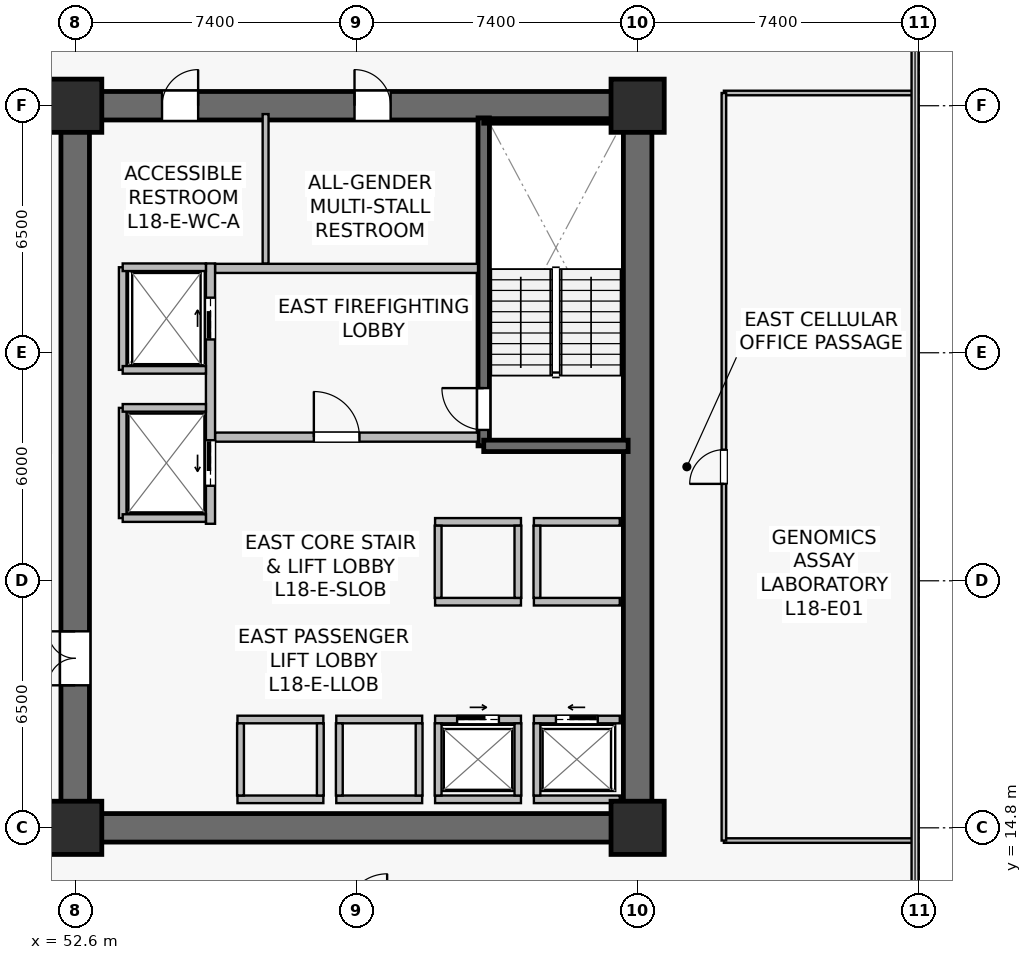
"""IFC4 building model, lengths in metres.
Left out: names, types, materials, properties, quantities, classifications, styles, units other than length and angle.
Written with IfcOpenShell. Run it as: python <this file> out.ifc"""

import sys

from ifc_helpers import new_model, si_unit, direction, frame, frame_2d, origin, origin_2d, place, context, subcontext, project, spatial, rectangle, extrude, source, transform, mapped, element, fill, save


model = new_model("IFC4")
c1 = context("Model", 3, precision=1e-05, world=origin(), true_north=direction((0.0, 1.0)))
c2 = subcontext(c1, "Body", "Model", "MODEL_VIEW")
j1 = project(units=[si_unit("LENGTHUNIT", "METRE"), si_unit("PLANEANGLEUNIT", "RADIAN")], contexts=[c1])
p1 = place(None, origin())
s1 = spatial("IfcSite", under=j1, at=p1, CompositionType="ELEMENT")
p2 = place(p1, origin())
s2 = spatial("IfcBuilding", under=s1, at=p2, CompositionType="ELEMENT")
p3 = place(p2, frame((0.0, 0.0, 74.4)))
s3 = spatial("IfcBuildingStorey", under=s2, at=p3, CompositionType="ELEMENT", Elevation=74.4)
p4 = place(p3, frame((52.225, 14.8, 0.0), z_axis=(0.0, 0.0, 1.0), x_axis=(1.0, 0.0, 0.0)))
e1 = element("IfcWall", 1, at=p4, inside=s3, PredefinedType="SHEAR", context=c2, shape_type="SweptSolid", body=[
    extrude(rectangle(XDim=15.55, YDim=0.75, at=frame_2d((7.775, 0.0))), origin(), (0.0, 0.0, 1.0), 3.78),
])
p5 = place(p3, frame((52.225, 33.8, 0.0), z_axis=(0.0, 0.0, 1.0), x_axis=(1.0, 0.0, 0.0)))
e2 = element("IfcWall", 2, at=p5, inside=s3, PredefinedType="SHEAR", context=c2, shape_type="SweptSolid", body=[
    extrude(rectangle(XDim=15.55, YDim=0.75, at=frame_2d((7.775, 0.0))), origin(), (0.0, 0.0, 1.0), 3.78),
])
p6 = place(p5, frame((7.725, 0.0, 0.0)))
e3 = element("IfcOpeningElement", 3, at=p6, cuts=e2, PredefinedType="OPENING", context=c2, shape_type="SweptSolid", body=[
    extrude(rectangle(XDim=0.95, YDim=2.15, at=frame_2d((0.475, 1.075))), frame((0.0, 0.385, 0.0), z_axis=(0.0, -1.0, 0.0), x_axis=(1.0, 0.0, 0.0)), (0.0, 0.0, 1.0), 0.77),
])
p7 = place(p5, frame((2.66, 0.0, 0.0)))
e4 = element("IfcOpeningElement", 4, at=p7, cuts=e2, PredefinedType="OPENING", context=c2, shape_type="SweptSolid", body=[
    extrude(rectangle(XDim=0.95, YDim=2.15, at=frame_2d((0.475, 1.075))), frame((0.0, 0.385, 0.0), z_axis=(0.0, -1.0, 0.0), x_axis=(1.0, 0.0, 0.0)), (0.0, 0.0, 1.0), 0.77),
])
p8 = place(p3, frame((52.6, 15.175, 0.0), z_axis=(0.0, 0.0, 1.0), x_axis=(0.0, 1.0, 0.0)))
e5 = element("IfcWall", 5, at=p8, inside=s3, PredefinedType="SHEAR", context=c2, shape_type="SweptSolid", body=[
    extrude(rectangle(XDim=18.25, YDim=0.75, at=frame_2d((9.125, 0.0))), origin(), (0.0, 0.0, 1.0), 3.78),
])
p9 = place(p8, frame((3.375, 0.0, 0.0)))
e6 = element("IfcOpeningElement", 6, at=p9, cuts=e5, PredefinedType="OPENING", context=c2, shape_type="SweptSolid", body=[
    extrude(rectangle(XDim=1.42, YDim=2.2, at=frame_2d((0.71, 1.1))), frame((0.0, 0.385, 0.0), z_axis=(0.0, -1.0, 0.0), x_axis=(1.0, 0.0, 0.0)), (0.0, 0.0, 1.0), 0.77),
])
p10 = place(p3, frame((67.4, 15.175, 0.0), z_axis=(0.0, 0.0, 1.0), x_axis=(0.0, 1.0, 0.0)))
e7 = element("IfcWall", 7, at=p10, inside=s3, PredefinedType="SHEAR", context=c2, shape_type="SweptSolid", body=[
    extrude(rectangle(XDim=18.25, YDim=0.75, at=frame_2d((9.125, 0.0))), origin(), (0.0, 0.0, 1.0), 3.78),
])
p11 = place(p3, frame((63.35, 24.85, 0.0), z_axis=(0.0, 0.0, 1.0), x_axis=(0.0, 1.0, 0.0)))
e8 = element("IfcWall", 8, at=p11, inside=s3, PredefinedType="SHEAR", context=c2, shape_type="SweptSolid", body=[
    extrude(rectangle(XDim=8.63, YDim=0.3, at=frame_2d((4.315, 0.0))), origin(), (0.0, 0.0, 1.0), 3.78),
])
p12 = place(p11, frame((0.42, 0.0, 0.0)))
e9 = element("IfcOpeningElement", 9, at=p12, cuts=e8, PredefinedType="OPENING", context=c2, shape_type="SweptSolid", body=[
    extrude(rectangle(XDim=1.1, YDim=2.15, at=frame_2d((0.55, 1.075))), frame((0.0, 0.16, 0.0), z_axis=(0.0, -1.0, 0.0), x_axis=(1.0, 0.0, 0.0)), (0.0, 0.0, 1.0), 0.32),
])
p13 = place(p3, frame((63.35, 24.85, 0.0), z_axis=(0.0, 0.0, 1.0), x_axis=(1.0, 0.0, 0.0)))
e10 = element("IfcWall", 10, at=p13, inside=s3, PredefinedType="SHEAR", context=c2, shape_type="SweptSolid", body=[
    extrude(rectangle(XDim=3.8, YDim=0.3, at=frame_2d((1.9, 0.0))), origin(), (0.0, 0.0, 1.0), 3.78),
])
p14 = place(p3, frame((63.35, 33.4, 0.0), z_axis=(0.0, 0.0, 1.0), x_axis=(1.0, 0.0, 0.0)))
e11 = element("IfcWall", 11, at=p14, inside=s3, PredefinedType="SOLIDWALL", context=c2, shape_type="SweptSolid", body=[
    extrude(rectangle(XDim=3.72, YDim=0.12, at=frame_2d((1.86, 0.0))), origin(), (0.0, 0.0, 1.0), 3.78),
])
m1 = source(origin(), c2, "Body", "SweptSolid", [
    extrude(rectangle(XDim=1.4, YDim=1.4, at=origin_2d()), origin(), (0.0, 0.0, 1.0), 4.1),
])
for number, where, z_axis, x_axis in (
    (12, (52.6, 14.8, 0.0), (0.0, 0.0, 1.0), (1.0, 0.0, 0.0)),
    (13, (67.4, 14.8, 0.0), (0.0, 0.0, 1.0), (1.0, 0.0, 0.0)),
    (14, (52.6, 33.8, 0.0), (0.0, 0.0, 1.0), (1.0, 0.0, 0.0)),
    (15, (67.4, 33.8, 0.0), (0.0, 0.0, 1.0), (1.0, 0.0, 0.0)),
):
    element("IfcColumn", number, at=place(p3, frame(where, z_axis=z_axis, x_axis=x_axis)), inside=s3, PredefinedType="COLUMN", context=c2, shape_type="MappedRepresentation", body=[
        mapped(m1, transform((0.0, 0.0, 0.0), scale=1.0)),
    ])
p15 = place(p3, frame((56.28, 25.08, 0.0), z_axis=(0.0, 0.0, 1.0), x_axis=(1.0, 0.0, 0.0)))
e16 = element("IfcWall", 16, at=p15, inside=s3, PredefinedType="SOLIDWALL", context=c2, shape_type="SweptSolid", body=[
    extrude(rectangle(XDim=6.92, YDim=0.24, at=frame_2d((3.46, 0.0))), origin(), (0.0, 0.0, 1.0), 3.115),
])
p16 = place(p15, frame((2.6, 0.0, 0.0)))
e17 = element("IfcOpeningElement", 17, at=p16, cuts=e16, PredefinedType="OPENING", context=c2, shape_type="SweptSolid", body=[
    extrude(rectangle(XDim=1.2, YDim=2.16, at=frame_2d((0.6, 1.08))), frame((0.0, 0.13, 0.0), z_axis=(0.0, -1.0, 0.0), x_axis=(1.0, 0.0, 0.0)), (0.0, 0.0, 1.0), 0.26),
])
p17 = place(p3, frame((56.28, 29.52, 0.0), z_axis=(0.0, 0.0, 1.0), x_axis=(1.0, 0.0, 0.0)))
e18 = element("IfcWall", 18, at=p17, inside=s3, PredefinedType="SOLIDWALL", context=c2, shape_type="SweptSolid", body=[
    extrude(rectangle(XDim=6.92, YDim=0.24, at=frame_2d((3.46, 0.0))), origin(), (0.0, 0.0, 1.0), 3.115),
])
p18 = place(p3, frame((56.16, 22.8, 0.0), z_axis=(0.0, 0.0, 1.0), x_axis=(0.0, 1.0, 0.0)))
e19 = element("IfcWall", 19, at=p18, inside=s3, PredefinedType="SOLIDWALL", context=c2, shape_type="SweptSolid", body=[
    extrude(rectangle(XDim=6.85, YDim=0.24, at=frame_2d((3.425, 0.0))), origin(), (0.0, 0.0, 1.0), 2.865),
])
p19 = place(p18, frame((4.85, 0.0, 0.0)))
e20 = element("IfcOpeningElement", 20, at=p19, cuts=e19, PredefinedType="OPENING", context=c2, shape_type="SweptSolid", body=[
    extrude(rectangle(XDim=1.1, YDim=2.22, at=frame_2d((0.55, 1.11))), frame((0.0, 0.13, 0.0), z_axis=(0.0, -1.0, 0.0), x_axis=(1.0, 0.0, 0.0)), (0.0, 0.0, 1.0), 0.26),
])
p20 = place(p18, frame((1.0, 0.0, 0.0)))
e21 = element("IfcOpeningElement", 21, at=p20, cuts=e19, PredefinedType="OPENING", context=c2, shape_type="SweptSolid", body=[
    extrude(rectangle(XDim=1.2, YDim=2.22, at=frame_2d((0.6, 1.11))), frame((0.0, 0.13, 0.0), z_axis=(0.0, -1.0, 0.0), x_axis=(1.0, 0.0, 0.0)), (0.0, 0.0, 1.0), 0.26),
])
p21 = place(p3, frame((64.67, 17.65, 0.0), z_axis=(0.0, 0.0, 1.0), x_axis=(1.0, 0.0, 0.0)))
e22 = element("IfcWall", 22, at=p21, inside=s3, PredefinedType="SOLIDWALL", context=c2, shape_type="SweptSolid", body=[
    extrude(rectangle(XDim=2.26, YDim=0.2, at=frame_2d((1.13, 0.0))), origin(), (0.0, 0.0, 1.0), 3.78),
])
p22 = place(p21, frame((0.58, 0.0, 0.0)))
e23 = element("IfcOpeningElement", 23, at=p22, cuts=e22, PredefinedType="OPENING", context=c2, shape_type="SweptSolid", body=[
    extrude(rectangle(XDim=1.1, YDim=2.22, at=frame_2d((0.55, 1.11))), frame((0.0, 0.11, 0.0), z_axis=(0.0, -1.0, 0.0), x_axis=(1.0, 0.0, 0.0)), (0.0, 0.0, 1.0), 0.22),
])
p23 = place(p3, frame((64.67, 15.55, 0.0), z_axis=(0.0, 0.0, 1.0), x_axis=(1.0, 0.0, 0.0)))
e24 = element("IfcWall", 24, at=p23, inside=s3, PredefinedType="SOLIDWALL", context=c2, shape_type="SweptSolid", body=[
    extrude(rectangle(XDim=2.26, YDim=0.2, at=frame_2d((1.13, 0.0))), origin(), (0.0, 0.0, 1.0), 3.78),
])
p24 = place(p3, frame((64.75, 15.65, 0.0), z_axis=(0.0, 0.0, 1.0), x_axis=(0.0, 1.0, 0.0)))
e25 = element("IfcWall", 25, at=p24, inside=s3, PredefinedType="SOLIDWALL", context=c2, shape_type="SweptSolid", body=[
    extrude(rectangle(XDim=1.9, YDim=0.18, at=frame_2d((0.95, 0.0))), origin(), (0.0, 0.0, 1.0), 3.78),
])
p25 = place(p3, frame((62.07, 17.65, 0.0), z_axis=(0.0, 0.0, 1.0), x_axis=(1.0, 0.0, 0.0)))
e26 = element("IfcWall", 26, at=p25, inside=s3, PredefinedType="SOLIDWALL", context=c2, shape_type="SweptSolid", body=[
    extrude(rectangle(XDim=2.26, YDim=0.2, at=frame_2d((1.13, 0.0))), origin(), (0.0, 0.0, 1.0), 3.78),
])
p26 = place(p25, frame((0.58, 0.0, 0.0)))
e27 = element("IfcOpeningElement", 27, at=p26, cuts=e26, PredefinedType="OPENING", context=c2, shape_type="SweptSolid", body=[
    extrude(rectangle(XDim=1.1, YDim=2.22, at=frame_2d((0.55, 1.11))), frame((0.0, 0.11, 0.0), z_axis=(0.0, -1.0, 0.0), x_axis=(1.0, 0.0, 0.0)), (0.0, 0.0, 1.0), 0.22),
])
p27 = place(p3, frame((62.07, 15.55, 0.0), z_axis=(0.0, 0.0, 1.0), x_axis=(1.0, 0.0, 0.0)))
e28 = element("IfcWall", 28, at=p27, inside=s3, PredefinedType="SOLIDWALL", context=c2, shape_type="SweptSolid", body=[
    extrude(rectangle(XDim=2.26, YDim=0.2, at=frame_2d((1.13, 0.0))), origin(), (0.0, 0.0, 1.0), 3.78),
])
for number, where, z_axis, x_axis in (
    (29, (62.15, 15.65, 0.0), (0.0, 0.0, 1.0), (0.0, 1.0, 0.0)),
    (30, (64.25, 15.65, 0.0), (0.0, 0.0, 1.0), (0.0, 1.0, 0.0)),
):
    element("IfcWall", number, at=place(p3, frame(where, z_axis=z_axis, x_axis=x_axis)), inside=s3, PredefinedType="SOLIDWALL", context=c2, shape_type="SweptSolid", body=[
        extrude(rectangle(XDim=1.9, YDim=0.18, at=frame_2d((0.95, 0.0))), origin(), (0.0, 0.0, 1.0), 3.78),
    ])
for number, where, z_axis, x_axis in (
    (31, (59.47, 17.65, 0.0), (0.0, 0.0, 1.0), (1.0, 0.0, 0.0)),
    (32, (59.47, 15.55, 0.0), (0.0, 0.0, 1.0), (1.0, 0.0, 0.0)),
):
    element("IfcWall", number, at=place(p3, frame(where, z_axis=z_axis, x_axis=x_axis)), inside=s3, PredefinedType="SOLIDWALL", context=c2, shape_type="SweptSolid", body=[
        extrude(rectangle(XDim=2.26, YDim=0.2, at=frame_2d((1.13, 0.0))), origin(), (0.0, 0.0, 1.0), 3.115),
    ])
for number, where, z_axis, x_axis in (
    (33, (59.55, 15.65, 0.0), (0.0, 0.0, 1.0), (0.0, 1.0, 0.0)),
    (34, (61.65, 15.65, 0.0), (0.0, 0.0, 1.0), (0.0, 1.0, 0.0)),
):
    element("IfcWall", number, at=place(p3, frame(where, z_axis=z_axis, x_axis=x_axis)), inside=s3, PredefinedType="SOLIDWALL", context=c2, shape_type="SweptSolid", body=[
        extrude(rectangle(XDim=1.9, YDim=0.18, at=frame_2d((0.95, 0.0))), origin(), (0.0, 0.0, 1.0), 3.78),
    ])
for number, where, z_axis, x_axis in (
    (35, (56.87, 17.65, 0.0), (0.0, 0.0, 1.0), (1.0, 0.0, 0.0)),
    (36, (56.87, 15.55, 0.0), (0.0, 0.0, 1.0), (1.0, 0.0, 0.0)),
):
    element("IfcWall", number, at=place(p3, frame(where, z_axis=z_axis, x_axis=x_axis)), inside=s3, PredefinedType="SOLIDWALL", context=c2, shape_type="SweptSolid", body=[
        extrude(rectangle(XDim=2.26, YDim=0.2, at=frame_2d((1.13, 0.0))), origin(), (0.0, 0.0, 1.0), 3.78),
    ])
for number, where, z_axis, x_axis in (
    (37, (56.95, 15.65, 0.0), (0.0, 0.0, 1.0), (0.0, 1.0, 0.0)),
    (38, (59.05, 15.65, 0.0), (0.0, 0.0, 1.0), (0.0, 1.0, 0.0)),
):
    element("IfcWall", number, at=place(p3, frame(where, z_axis=z_axis, x_axis=x_axis)), inside=s3, PredefinedType="SOLIDWALL", context=c2, shape_type="SweptSolid", body=[
        extrude(rectangle(XDim=1.9, YDim=0.18, at=frame_2d((0.95, 0.0))), origin(), (0.0, 0.0, 1.0), 3.78),
    ])
for number, where, z_axis, x_axis in (
    (39, (64.67, 20.75, 0.0), (0.0, 0.0, 1.0), (1.0, 0.0, 0.0)),
    (40, (64.67, 22.85, 0.0), (0.0, 0.0, 1.0), (1.0, 0.0, 0.0)),
):
    element("IfcWall", number, at=place(p3, frame(where, z_axis=z_axis, x_axis=x_axis)), inside=s3, PredefinedType="SOLIDWALL", context=c2, shape_type="SweptSolid", body=[
        extrude(rectangle(XDim=2.26, YDim=0.2, at=frame_2d((1.13, 0.0))), origin(), (0.0, 0.0, 1.0), 3.78),
    ])
p28 = place(p3, frame((64.75, 20.85, 0.0), z_axis=(0.0, 0.0, 1.0), x_axis=(0.0, 1.0, 0.0)))
e41 = element("IfcWall", 41, at=p28, inside=s3, PredefinedType="SOLIDWALL", context=c2, shape_type="SweptSolid", body=[
    extrude(rectangle(XDim=1.9, YDim=0.18, at=frame_2d((0.95, 0.0))), origin(), (0.0, 0.0, 1.0), 3.78),
])
for number, where, z_axis, x_axis in (
    (42, (62.07, 20.75, 0.0), (0.0, 0.0, 1.0), (1.0, 0.0, 0.0)),
    (43, (62.07, 22.85, 0.0), (0.0, 0.0, 1.0), (1.0, 0.0, 0.0)),
):
    element("IfcWall", number, at=place(p3, frame(where, z_axis=z_axis, x_axis=x_axis)), inside=s3, PredefinedType="SOLIDWALL", context=c2, shape_type="SweptSolid", body=[
        extrude(rectangle(XDim=2.26, YDim=0.2, at=frame_2d((1.13, 0.0))), origin(), (0.0, 0.0, 1.0), 3.78),
    ])
for number, where, z_axis, x_axis in (
    (44, (62.15, 20.85, 0.0), (0.0, 0.0, 1.0), (0.0, 1.0, 0.0)),
    (45, (64.25, 20.85, 0.0), (0.0, 0.0, 1.0), (0.0, 1.0, 0.0)),
):
    element("IfcWall", number, at=place(p3, frame(where, z_axis=z_axis, x_axis=x_axis)), inside=s3, PredefinedType="SOLIDWALL", context=c2, shape_type="SweptSolid", body=[
        extrude(rectangle(XDim=1.9, YDim=0.18, at=frame_2d((0.95, 0.0))), origin(), (0.0, 0.0, 1.0), 3.78),
    ])
p29 = place(p3, frame((53.85, 26.85, 0.0), z_axis=(0.0, 0.0, 1.0), x_axis=(0.0, 1.0, 0.0)))
e46 = element("IfcWall", 46, at=p29, inside=s3, PredefinedType="SOLIDWALL", context=c2, shape_type="SweptSolid", body=[
    extrude(rectangle(XDim=2.7, YDim=0.2, at=frame_2d((1.35, 0.0))), origin(), (0.0, 0.0, 1.0), 3.78),
])
p30 = place(p3, frame((53.85, 29.55, 0.0), z_axis=(0.0, 0.0, 1.0), x_axis=(1.0, 0.0, 0.0)))
e47 = element("IfcWall", 47, at=p30, inside=s3, PredefinedType="SOLIDWALL", context=c2, shape_type="SweptSolid", body=[
    extrude(rectangle(XDim=2.19, YDim=0.2, at=frame_2d((1.095, 0.0))), origin(), (0.0, 0.0, 1.0), 3.78),
])
p31 = place(p3, frame((53.85, 26.85, 0.0), z_axis=(0.0, 0.0, 1.0), x_axis=(1.0, 0.0, 0.0)))
e48 = element("IfcWall", 48, at=p31, inside=s3, PredefinedType="SOLIDWALL", context=c2, shape_type="SweptSolid", body=[
    extrude(rectangle(XDim=2.19, YDim=0.2, at=frame_2d((1.095, 0.0))), origin(), (0.0, 0.0, 1.0), 3.177),
])
p32 = place(p3, frame((53.85, 22.95, 0.0), z_axis=(0.0, 0.0, 1.0), x_axis=(0.0, 1.0, 0.0)))
e49 = element("IfcWall", 49, at=p32, inside=s3, PredefinedType="SOLIDWALL", context=c2, shape_type="SweptSolid", body=[
    extrude(rectangle(XDim=2.9, YDim=0.2, at=frame_2d((1.45, 0.0))), origin(), (0.0, 0.0, 1.0), 2.865),
])
for number, where, z_axis, x_axis in (
    (50, (53.85, 25.85, 0.0), (0.0, 0.0, 1.0), (1.0, 0.0, 0.0)),
    (51, (53.85, 22.95, 0.0), (0.0, 0.0, 1.0), (1.0, 0.0, 0.0)),
):
    element("IfcWall", number, at=place(p3, frame(where, z_axis=z_axis, x_axis=x_axis)), inside=s3, PredefinedType="SOLIDWALL", context=c2, shape_type="SweptSolid", body=[
        extrude(rectangle(XDim=2.19, YDim=0.2, at=frame_2d((1.095, 0.0))), origin(), (0.0, 0.0, 1.0), 3.78),
    ])
p33 = place(p3, frame((57.61, 29.65, 0.0), z_axis=(0.0, 0.0, 1.0), x_axis=(0.0, 1.0, 0.0)))
e52 = element("IfcWall", 52, at=p33, inside=s3, PredefinedType="PLUMBINGWALL", context=c2, shape_type="SweptSolid", body=[
    extrude(rectangle(XDim=3.93, YDim=0.155, at=frame_2d((1.965, 0.0))), origin(), (0.0, 0.0, 1.0), 3.78),
])
for number, where, z_axis, x_axis in (
    (53, (69.67, 14.465, 0.0), (0.0, 0.0, 1.0), (1.0, 0.0, 0.0)),
    (54, (69.67, 34.135, 0.0), (0.0, 0.0, 1.0), (1.0, 0.0, 0.0)),
):
    element("IfcWall", number, at=place(p3, frame(where, z_axis=z_axis, x_axis=x_axis)), inside=s3, PredefinedType="PARTITIONING", context=c2, shape_type="SweptSolid", body=[
        extrude(rectangle(XDim=5.02, YDim=0.12, at=frame_2d((2.51, 0.0))), origin(), (0.0, 0.0, 1.0), 3.78),
    ])
p34 = place(p3, frame((69.67, 14.465, 0.0), z_axis=(0.0, 0.0, 1.0), x_axis=(0.0, 1.0, 0.0)))
e55 = element("IfcWall", 55, at=p34, inside=s3, PredefinedType="PARTITIONING", context=c2, shape_type="SweptSolid", body=[
    extrude(rectangle(XDim=19.67, YDim=0.12, at=frame_2d((9.835, 0.0))), origin(), (0.0, 0.0, 1.0), 3.78),
])
p35 = place(p34, frame((9.385, 0.0, 0.0)))
e56 = element("IfcOpeningElement", 56, at=p35, cuts=e55, PredefinedType="OPENING", context=c2, shape_type="SweptSolid", body=[
    extrude(rectangle(XDim=0.9, YDim=2.1, at=frame_2d((0.45, 1.05))), frame((0.0, 0.07, 0.0), z_axis=(0.0, -1.0, 0.0), x_axis=(1.0, 0.0, 0.0)), (0.0, 0.0, 1.0), 0.14),
])
m2 = source(origin(), c2, "Body", "SweptSolid", [
    extrude(rectangle(XDim=1.1, YDim=2.15, at=frame_2d((0.55, 1.075))), frame((0.0, 0.025, 0.0), z_axis=(0.0, -1.0, 0.0), x_axis=(1.0, 0.0, 0.0)), (0.0, 0.0, 1.0), 0.05),
])
p36 = place(p12, origin())
e57 = element("IfcDoor", 57, at=p36, inside=s3, OperationType="SINGLE_SWING_RIGHT", PredefinedType="DOOR", context=c2, shape_type="MappedRepresentation", body=[
    mapped(m2, transform((0.0, 0.0, 0.0), scale=1.0)),
])
fill(e9, e57)
m3 = source(origin(), c2, "Body", "SweptSolid", [
    extrude(rectangle(XDim=1.2, YDim=2.16, at=frame_2d((0.6, 1.08))), frame((0.0, 0.025, 0.0), z_axis=(0.0, -1.0, 0.0), x_axis=(1.0, 0.0, 0.0)), (0.0, 0.0, 1.0), 0.05),
])
p37 = place(p16, origin())
e58 = element("IfcDoor", 58, at=p37, inside=s3, OperationType="SINGLE_SWING_LEFT", PredefinedType="DOOR", context=c2, shape_type="MappedRepresentation", body=[
    mapped(m3, transform((0.0, 0.0, 0.0), scale=1.0)),
])
fill(e17, e58)
m4 = source(origin(), c2, "Body", "SweptSolid", [
    extrude(rectangle(XDim=1.1, YDim=2.22, at=frame_2d((0.55, 1.11))), frame((0.0, 0.025, 0.0), z_axis=(0.0, -1.0, 0.0), x_axis=(1.0, 0.0, 0.0)), (0.0, 0.0, 1.0), 0.05),
])
p38 = place(p22, origin())
e59 = element("IfcDoor", 59, at=p38, inside=s3, OperationType="SLIDING_TO_LEFT", PredefinedType="USERDEFINED", context=c2, shape_type="MappedRepresentation", body=[
    mapped(m4, transform((0.0, 0.0, 0.0), scale=1.0)),
])
fill(e23, e59)
p39 = place(p26, origin())
e60 = element("IfcDoor", 60, at=p39, inside=s3, OperationType="SLIDING_TO_RIGHT", PredefinedType="USERDEFINED", context=c2, shape_type="MappedRepresentation", body=[
    mapped(m4, transform((0.0, 0.0, 0.0), scale=1.0)),
])
fill(e27, e60)
p40 = place(p19, origin())
e61 = element("IfcDoor", 61, at=p40, inside=s3, OperationType="SLIDING_TO_RIGHT", PredefinedType="USERDEFINED", context=c2, shape_type="MappedRepresentation", body=[
    mapped(m4, transform((0.0, 0.0, 0.0), scale=1.0)),
])
fill(e20, e61)
m5 = source(origin(), c2, "Body", "SweptSolid", [
    extrude(rectangle(XDim=1.2, YDim=2.22, at=frame_2d((0.6, 1.11))), frame((0.0, 0.025, 0.0), z_axis=(0.0, -1.0, 0.0), x_axis=(1.0, 0.0, 0.0)), (0.0, 0.0, 1.0), 0.05),
])
p41 = place(p20, origin())
e62 = element("IfcDoor", 62, at=p41, inside=s3, OperationType="SLIDING_TO_LEFT", PredefinedType="USERDEFINED", context=c2, shape_type="MappedRepresentation", body=[
    mapped(m5, transform((0.0, 0.0, 0.0), scale=1.0)),
])
fill(e21, e62)
m6 = source(origin(), c2, "Body", "SweptSolid", [
    extrude(rectangle(XDim=1.42, YDim=2.2, at=frame_2d((0.71, 1.1))), frame((0.0, 0.025, 0.0), z_axis=(0.0, -1.0, 0.0), x_axis=(1.0, 0.0, 0.0)), (0.0, 0.0, 1.0), 0.05),
])
p42 = place(p9, origin())
e63 = element("IfcDoor", 63, at=p42, inside=s3, OperationType="DOUBLE_DOOR_SINGLE_SWING", PredefinedType="DOOR", context=c2, shape_type="MappedRepresentation", body=[
    mapped(m6, transform((0.0, 0.0, 0.0), scale=1.0)),
])
fill(e6, e63)
m7 = source(origin(), c2, "Body", "SweptSolid", [
    extrude(rectangle(XDim=0.95, YDim=2.15, at=frame_2d((0.475, 1.075))), frame((0.0, 0.025, 0.0), z_axis=(0.0, -1.0, 0.0), x_axis=(1.0, 0.0, 0.0)), (0.0, 0.0, 1.0), 0.05),
])
p43 = place(p6, origin())
e64 = element("IfcDoor", 64, at=p43, inside=s3, OperationType="SINGLE_SWING_LEFT", PredefinedType="DOOR", context=c2, shape_type="MappedRepresentation", body=[
    mapped(m7, transform((0.0, 0.0, 0.0), scale=1.0)),
])
fill(e3, e64)
p44 = place(p7, origin())
e65 = element("IfcDoor", 65, at=p44, inside=s3, OperationType="SINGLE_SWING_RIGHT", PredefinedType="DOOR", context=c2, shape_type="MappedRepresentation", body=[
    mapped(m7, transform((0.0, 0.0, 0.0), scale=1.0)),
])
fill(e4, e65)
m8 = source(origin(), c2, "Body", "SweptSolid", [
    extrude(rectangle(XDim=0.9, YDim=2.1, at=frame_2d((0.45, 1.05))), frame((0.0, 0.025, 0.0), z_axis=(0.0, -1.0, 0.0), x_axis=(1.0, 0.0, 0.0)), (0.0, 0.0, 1.0), 0.05),
])
p45 = place(p35, origin())
e66 = element("IfcDoor", 66, at=p45, inside=s3, OperationType="SINGLE_SWING_LEFT", PredefinedType="DOOR", context=c2, shape_type="MappedRepresentation", body=[
    mapped(m8, transform((0.0, 0.0, 0.0), scale=1.0)),
])
fill(e56, e66)
save(model, sys.argv[1])
